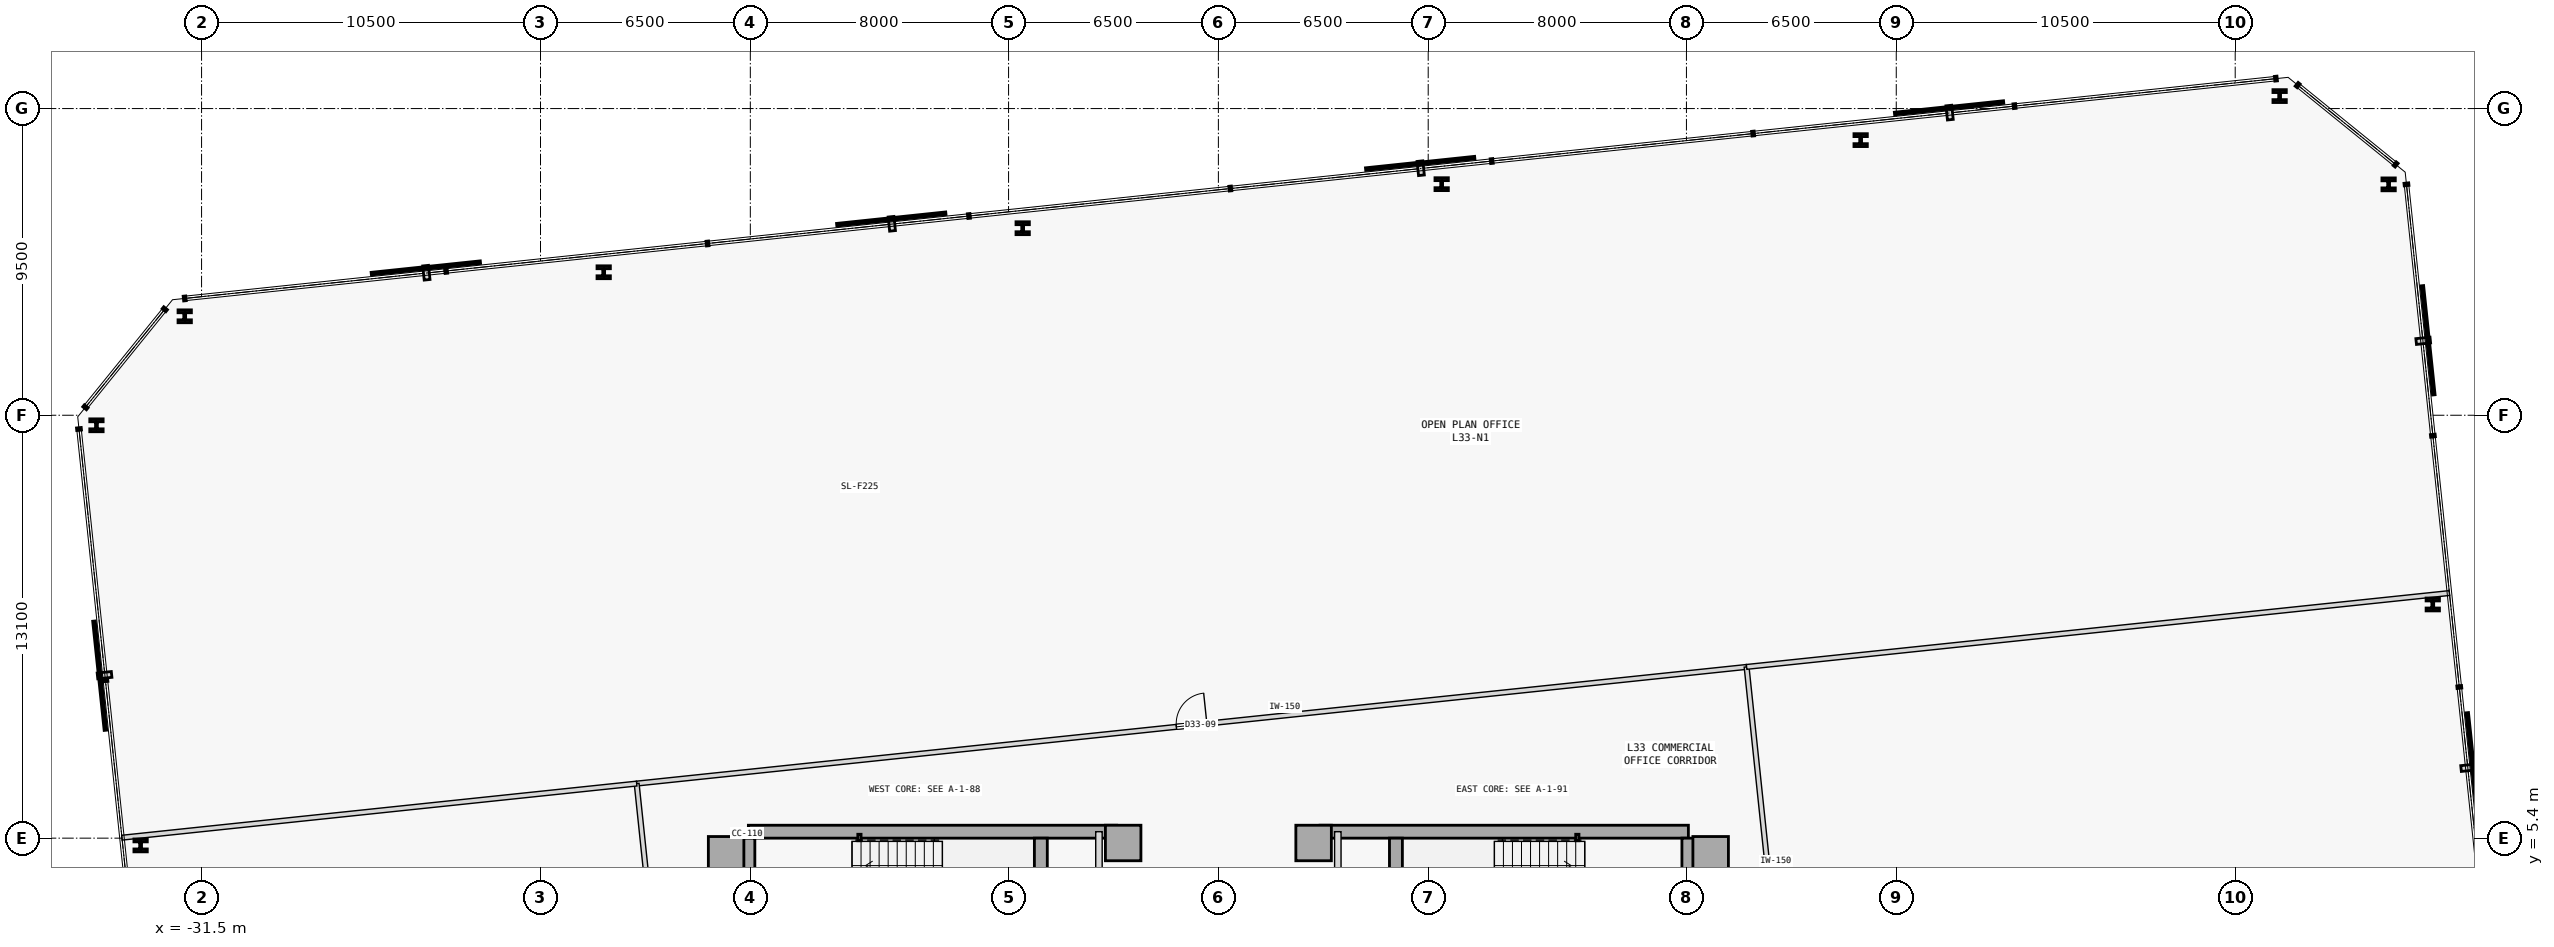
"""IFC4 building model, lengths in metres.
Left out: names, types, materials, properties, quantities, classifications, styles, units other than length and angle.
Written with IfcOpenShell. Run it as: python <this file> out.ifc"""

import sys

from ifc_helpers import new_model, si_unit, direction, frame, frame_2d, origin, origin_2d, place, context, subcontext, project, spatial, rectangle, hollow_rectangle, i_section, extrude, element, fill, save


model = new_model("IFC4")
c1 = context("Model", 3, precision=1e-05, world=origin(), true_north=direction((0.0, 1.0)))
c2 = subcontext(c1, "Body", "Model", "MODEL_VIEW")
j1 = project(units=[si_unit("LENGTHUNIT", "METRE"), si_unit("PLANEANGLEUNIT", "RADIAN")], contexts=[c1])
p1 = place(None, origin())
s1 = spatial("IfcSite", under=j1, at=p1, CompositionType="ELEMENT")
p2 = place(p1, origin())
s2 = spatial("IfcBuilding", under=s1, at=p2, CompositionType="ELEMENT")
p3 = place(p2, frame((0.0, 0.0, 131.8)))
s3 = spatial("IfcBuildingStorey", under=s2, at=p3, CompositionType="ELEMENT", Elevation=131.8)
for number, where, z_axis, x_axis in (
    (1, (-15.25, 4.9, 0.0), (0.0, 0.0, 1.0), (1.0, 0.0, 0.0)),
    (2, (-2.95, 5.25, 0.0), (0.0, 0.0, 1.0), (1.0, 0.0, 0.0)),
    (3, (15.25, 4.9, 0.0), (0.0, 0.0, 1.0), (1.0, 0.0, 0.0)),
    (4, (2.95, 5.25, 0.0), (0.0, 0.0, 1.0), (1.0, 0.0, 0.0)),
):
    element("IfcColumn", number, at=place(p3, frame(where, z_axis=z_axis, x_axis=x_axis)), inside=s3, PredefinedType="COLUMN", context=c2, shape_type="SweptSolid", body=[
        extrude(rectangle(XDim=1.1, YDim=1.1, at=origin_2d()), origin(), (0.0, 0.0, 1.0), 3.7),
    ])
p4 = place(p3, frame((-14.56, 5.6, 0.0), z_axis=(0.0, 0.0, 1.0), x_axis=(1.0, 0.0, 0.0)))
e5 = element("IfcWall", 5, at=p4, inside=s3, PredefinedType="SHEAR", context=c2, shape_type="SweptSolid", body=[
    extrude(rectangle(XDim=11.41, YDim=0.4, at=frame_2d((5.705, 0.0))), origin(), (0.0, 0.0, 1.0), 3.475),
])
p5 = place(p3, frame((-14.56, -5.4, 0.0), z_axis=(0.0, 0.0, 1.0), x_axis=(0.0, 1.0, 0.0)))
e6 = element("IfcWall", 6, at=p5, inside=s3, PredefinedType="SHEAR", context=c2, shape_type="SweptSolid", body=[
    extrude(rectangle(XDim=10.8, YDim=0.4, at=frame_2d((5.4, 0.0))), origin(), (0.0, 0.0, 1.0), 3.475),
])
p6 = place(p3, frame((-5.5, 2.15, 0.0), z_axis=(0.0, 0.0, 1.0), x_axis=(0.0, 1.0, 0.0)))
e7 = element("IfcWall", 7, at=p6, inside=s3, PredefinedType="SHEAR", context=c2, shape_type="SweptSolid", body=[
    extrude(rectangle(XDim=3.25, YDim=0.4, at=frame_2d((1.625, 0.0))), origin(), (0.0, 0.0, 1.0), 3.475),
])
p7 = place(p3, frame((3.15, 5.6, 0.0), z_axis=(0.0, 0.0, 1.0), x_axis=(1.0, 0.0, 0.0)))
e8 = element("IfcWall", 8, at=p7, inside=s3, PredefinedType="SHEAR", context=c2, shape_type="SweptSolid", body=[
    extrude(rectangle(XDim=11.41, YDim=0.4, at=frame_2d((5.705, 0.0))), origin(), (0.0, 0.0, 1.0), 3.475),
])
p8 = place(p3, frame((14.56, -5.4, 0.0), z_axis=(0.0, 0.0, 1.0), x_axis=(0.0, 1.0, 0.0)))
e9 = element("IfcWall", 9, at=p8, inside=s3, PredefinedType="SHEAR", context=c2, shape_type="SweptSolid", body=[
    extrude(rectangle(XDim=10.8, YDim=0.4, at=frame_2d((5.4, 0.0))), origin(), (0.0, 0.0, 1.0), 3.475),
])
p9 = place(p3, frame((5.5, 2.15, 0.0), z_axis=(0.0, 0.0, 1.0), x_axis=(0.0, 1.0, 0.0)))
e10 = element("IfcWall", 10, at=p9, inside=s3, PredefinedType="SHEAR", context=c2, shape_type="SweptSolid", body=[
    extrude(rectangle(XDim=3.25, YDim=0.4, at=frame_2d((1.625, 0.0))), origin(), (0.0, 0.0, 1.0), 3.475),
])
for number, where, z_axis, x_axis in (
    (11, (-11.12, 5.42, 0.0), (0.0, 0.0, 1.0), (1.0, 0.0, 0.0)),
    (12, (11.12, 5.42, 0.0), (0.0, 0.0, 1.0), (1.0, 0.0, 0.0)),
):
    element("IfcColumn", number, at=place(p3, frame(where, z_axis=z_axis, x_axis=x_axis)), inside=s3, PredefinedType="COLUMN", context=c2, shape_type="SweptSolid", body=[
        extrude(hollow_rectangle(XDim=0.1, YDim=0.2, WallThickness=0.008, at=origin_2d()), origin(), (0.0, 0.0, 1.0), 3.7),
    ])
for number, where, z_axis, x_axis in (
    (13, (37.621, 12.638, 0.0), (0.0, 0.0, 1.0), (1.0, 0.0, 0.0)),
    (14, (36.253, 25.652, 0.0), (0.0, 0.0, 1.0), (1.0, 0.0, 0.0)),
    (15, (32.876, 28.386, 0.0), (0.0, 0.0, 1.0), (1.0, 0.0, 0.0)),
    (16, (19.897, 27.022, 0.0), (0.0, 0.0, 1.0), (1.0, 0.0, 0.0)),
    (17, (6.917, 25.658, 0.0), (0.0, 0.0, 1.0), (1.0, 0.0, 0.0)),
    (18, (-6.062, 24.293, 0.0), (0.0, 0.0, 1.0), (1.0, 0.0, 0.0)),
    (19, (-19.042, 22.929, 0.0), (0.0, 0.0, 1.0), (1.0, 0.0, 0.0)),
    (20, (-32.022, 21.565, 0.0), (0.0, 0.0, 1.0), (1.0, 0.0, 0.0)),
    (21, (-34.756, 18.189, 0.0), (0.0, 0.0, 1.0), (1.0, 0.0, 0.0)),
    (22, (-33.388, 5.175, 0.0), (0.0, 0.0, 1.0), (1.0, 0.0, 0.0)),
):
    element("IfcColumn", number, at=place(p3, frame(where, z_axis=z_axis, x_axis=x_axis)), inside=s3, PredefinedType="COLUMN", context=c2, shape_type="SweptSolid", body=[
        extrude(i_section(OverallWidth=0.413, OverallDepth=0.398, WebThickness=0.056, FlangeThickness=0.089, FilletRadius=0.015, at=origin_2d()), origin(), (0.0, 0.0, 1.0), 3.7),
    ])
p10 = place(p3, frame((-3.7, -1.15, 0.0), z_axis=(0.0, 0.0, 1.0), x_axis=(0.0, 1.0, 0.0)))
e23 = element("IfcWall", 23, at=p10, inside=s3, PredefinedType="STANDARD", context=c2, shape_type="SweptSolid", body=[
    extrude(rectangle(XDim=6.75, YDim=0.2, at=frame_2d((3.375, 0.0))), origin(), (0.0, 0.0, 1.0), 3.475),
])
p11 = place(p10, frame((0.35, 0.0, 0.0)))
e24 = element("IfcOpeningElement", 24, at=p11, cuts=e23, PredefinedType="OPENING", context=c2, shape_type="SweptSolid", body=[
    extrude(rectangle(XDim=0.88, YDim=2.15, at=frame_2d((0.44, 1.075))), frame((0.0, 0.11, 0.0), z_axis=(0.0, -1.0, 0.0), x_axis=(1.0, 0.0, 0.0)), (0.0, 0.0, 1.0), 0.22),
])
p12 = place(p10, frame((2.55, 0.0, 0.0)))
e25 = element("IfcOpeningElement", 25, at=p12, cuts=e23, PredefinedType="OPENING", context=c2, shape_type="SweptSolid", body=[
    extrude(rectangle(XDim=0.92, YDim=2.15, at=frame_2d((0.46, 1.075))), frame((0.0, 0.11, 0.0), z_axis=(0.0, -1.0, 0.0), x_axis=(1.0, 0.0, 0.0)), (0.0, 0.0, 1.0), 0.22),
])
p13 = place(p10, frame((4.22, 0.0, 0.0)))
e26 = element("IfcOpeningElement", 26, at=p13, cuts=e23, PredefinedType="OPENING", context=c2, shape_type="SweptSolid", body=[
    extrude(rectangle(XDim=0.88, YDim=2.15, at=frame_2d((0.44, 1.075))), frame((0.0, 0.11, 0.0), z_axis=(0.0, -1.0, 0.0), x_axis=(1.0, 0.0, 0.0)), (0.0, 0.0, 1.0), 0.22),
])
p14 = place(p3, frame((3.7, -1.15, 0.0), z_axis=(0.0, 0.0, 1.0), x_axis=(0.0, 1.0, 0.0)))
e27 = element("IfcWall", 27, at=p14, inside=s3, PredefinedType="STANDARD", context=c2, shape_type="SweptSolid", body=[
    extrude(rectangle(XDim=6.75, YDim=0.2, at=frame_2d((3.375, 0.0))), origin(), (0.0, 0.0, 1.0), 3.475),
])
p15 = place(p14, frame((3.6, 0.0, 0.0)))
e28 = element("IfcOpeningElement", 28, at=p15, cuts=e27, PredefinedType="OPENING", context=c2, shape_type="SweptSolid", body=[
    extrude(rectangle(XDim=0.92, YDim=2.15, at=frame_2d((0.46, 1.075))), frame((0.0, 0.11, 0.0), z_axis=(0.0, -1.0, 0.0), x_axis=(1.0, 0.0, 0.0)), (0.0, 0.0, 1.0), 0.22),
])
p16 = place(p14, frame((0.85, 0.0, 0.0)))
e29 = element("IfcOpeningElement", 29, at=p16, cuts=e27, PredefinedType="OPENING", context=c2, shape_type="SweptSolid", body=[
    extrude(rectangle(XDim=0.9, YDim=2.15, at=frame_2d((0.45, 1.075))), frame((0.0, 0.11, 0.0), z_axis=(0.0, -1.0, 0.0), x_axis=(1.0, 0.0, 0.0)), (0.0, 0.0, 1.0), 0.22),
])
p17 = place(p3, frame((-18.021, 7.09, 0.0), z_axis=(0.0, 0.0, 1.0), x_axis=(0.994522464549, 0.104523047737, 0.0)))
e30 = element("IfcWall", 30, at=p17, inside=s3, PredefinedType="PARTITIONING", context=c2, shape_type="SweptSolid", body=[
    extrude(rectangle(XDim=34.574, YDim=0.15, at=frame_2d((17.287, 0.0))), origin(), (0.0, 0.0, 1.0), 3.475),
])
p18 = place(p17, frame((16.812, 0.0, 0.0)))
e31 = element("IfcOpeningElement", 31, at=p18, cuts=e30, PredefinedType="OPENING", context=c2, shape_type="SweptSolid", body=[
    extrude(rectangle(XDim=0.95, YDim=2.15, at=frame_2d((0.475, 1.075))), frame((0.0, 0.085, 0.0), z_axis=(0.0, -1.0, 0.0), x_axis=(1.0, 0.0, 0.0)), (0.0, 0.0, 1.0), 0.17),
])
p19 = place(p3, frame((-16.153, -10.682, 0.0), z_axis=(0.0, 0.0, 1.0), x_axis=(-0.104527614588, 0.994521984568, 0.0)))
e32 = element("IfcWall", 32, at=p19, inside=s3, PredefinedType="PARTITIONING", context=c2, shape_type="SweptSolid", body=[
    extrude(rectangle(XDim=17.87, YDim=0.15, at=frame_2d((8.935, 0.0))), origin(), (0.0, 0.0, 1.0), 3.475),
])
p20 = place(p19, frame((8.46, 0.0, 0.0)))
e33 = element("IfcOpeningElement", 33, at=p20, cuts=e32, PredefinedType="OPENING", context=c2, shape_type="SweptSolid", body=[
    extrude(rectangle(XDim=0.95, YDim=2.15, at=frame_2d((0.475, 1.075))), frame((0.0, 0.085, 0.0), z_axis=(0.0, -1.0, 0.0), x_axis=(1.0, 0.0, 0.0)), (0.0, 0.0, 1.0), 0.17),
])
p21 = place(p3, frame((18.231, -7.068, 0.0), z_axis=(0.0, 0.0, 1.0), x_axis=(-0.104529034836, 0.994521835294, 0.0)))
e34 = element("IfcWall", 34, at=p21, inside=s3, PredefinedType="PARTITIONING", context=c2, shape_type="SweptSolid", body=[
    extrude(rectangle(XDim=17.87, YDim=0.15, at=frame_2d((8.935, 0.0))), origin(), (0.0, 0.0, 1.0), 3.475),
])
p22 = place(p21, frame((8.46, 0.0, 0.0)))
e35 = element("IfcOpeningElement", 35, at=p22, cuts=e34, PredefinedType="OPENING", context=c2, shape_type="SweptSolid", body=[
    extrude(rectangle(XDim=0.95, YDim=2.15, at=frame_2d((0.475, 1.075))), frame((0.0, 0.085, 0.0), z_axis=(0.0, -1.0, 0.0), x_axis=(1.0, 0.0, 0.0)), (0.0, 0.0, 1.0), 0.17),
])
p23 = place(p3, frame((-33.967, 5.414, 0.0), z_axis=(0.0, 0.0, 1.0), x_axis=(0.994521211213, 0.104534972363, 0.0)))
e36 = element("IfcWall", 36, at=p23, inside=s3, PredefinedType="PARTITIONING", context=c2, shape_type="SweptSolid", body=[
    extrude(rectangle(XDim=16.033, YDim=0.15, at=frame_2d((8.017, 0.0))), origin(), (0.0, 0.0, 1.0), 3.475),
])
p24 = place(p3, frame((16.363, 10.704, 0.0), z_axis=(0.0, 0.0, 1.0), x_axis=(0.994521206634, 0.104535015934, 0.0)))
e37 = element("IfcWall", 37, at=p24, inside=s3, PredefinedType="PARTITIONING", context=c2, shape_type="SweptSolid", body=[
    extrude(rectangle(XDim=21.893, YDim=0.15, at=frame_2d((10.946, 0.0))), origin(), (0.0, 0.0, 1.0), 3.475),
])
p25 = place(p18, origin())
e38 = element("IfcDoor", 38, at=p25, inside=s3, OperationType="SINGLE_SWING_RIGHT", PredefinedType="DOOR", context=c2, shape_type="SweptSolid", body=[
    extrude(rectangle(XDim=0.95, YDim=2.15, at=frame_2d((0.475, 1.075))), frame((0.0, 0.025, 0.0), z_axis=(0.0, -1.0, 0.0), x_axis=(1.0, 0.0, 0.0)), (0.0, 0.0, 1.0), 0.05),
])
fill(e31, e38)
save(model, sys.argv[1])
